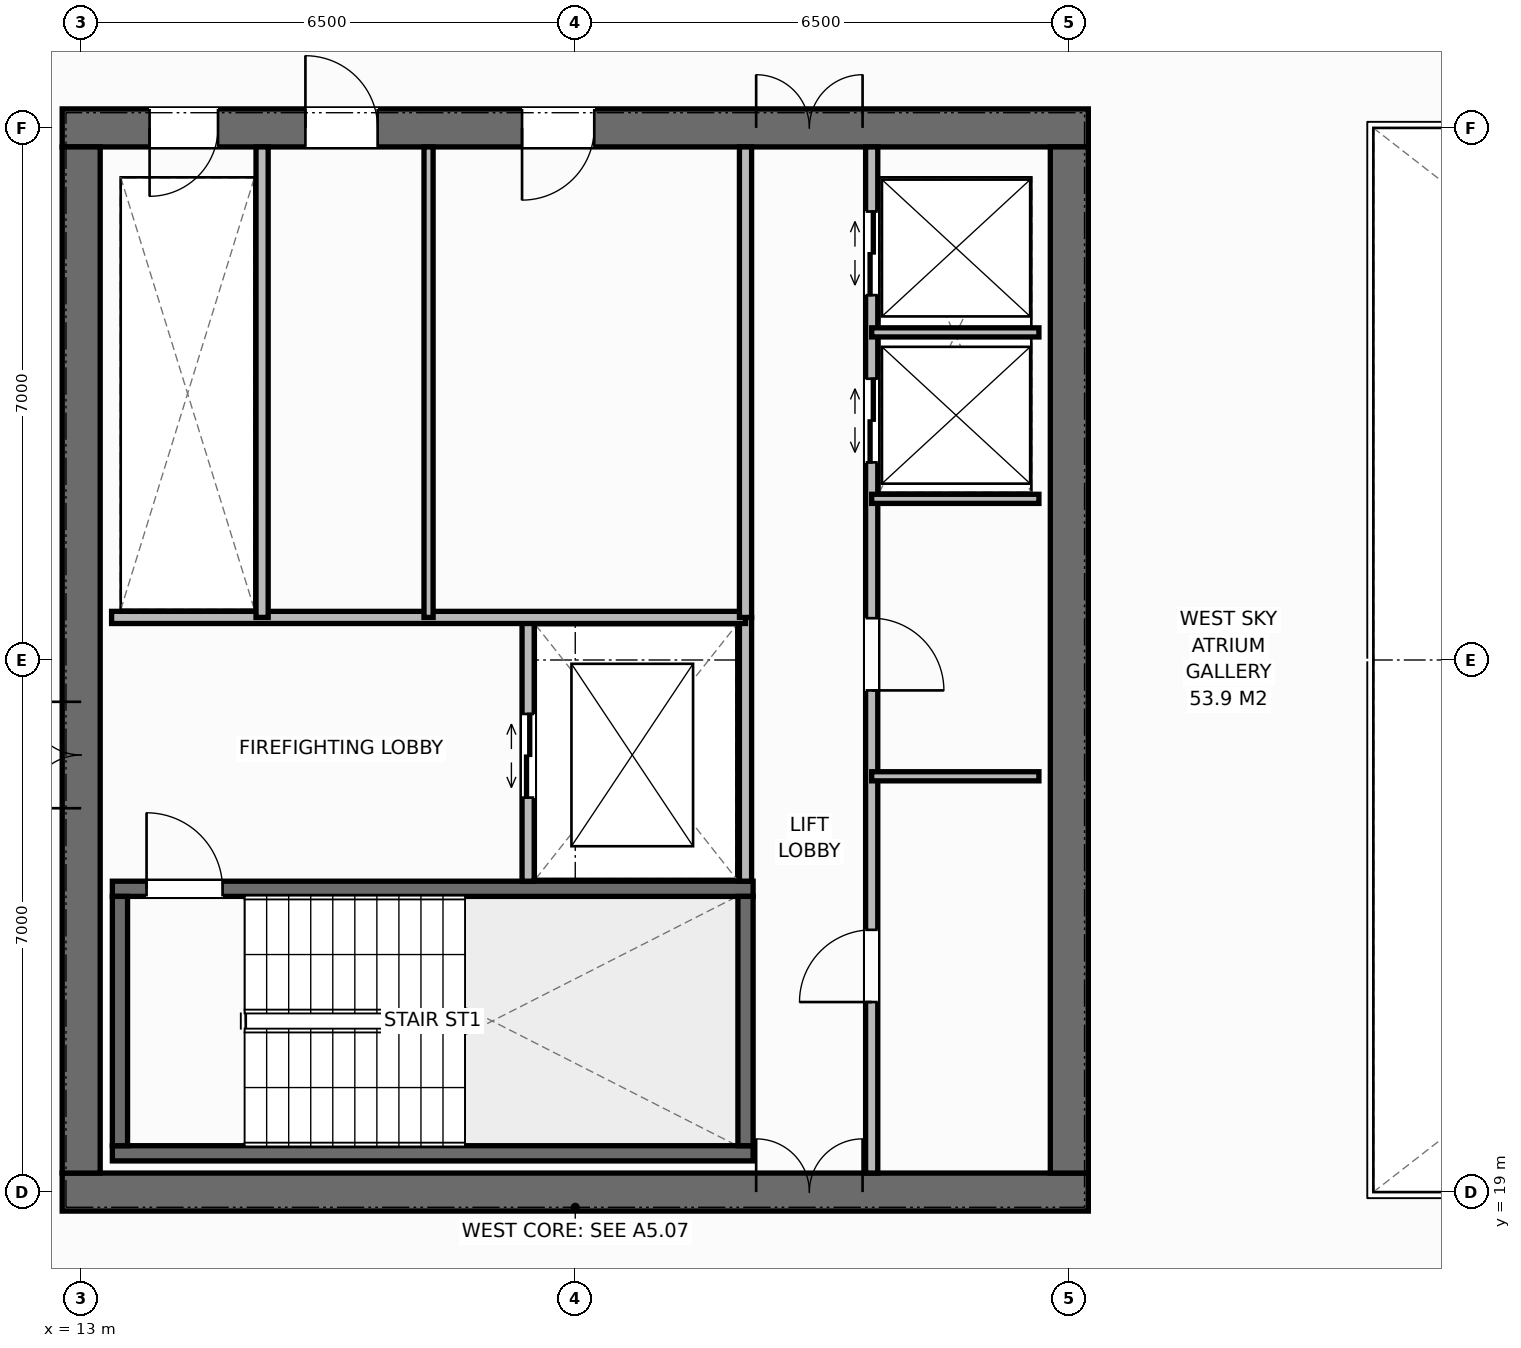
"""IFC4 building model, lengths in metres.
Left out: names, types, materials, properties, quantities, classifications, styles, units other than length and angle.
Written with IfcOpenShell. Run it as: python <this file> out.ifc"""

import sys

from ifc_helpers import new_model, si_unit, direction, frame, frame_2d, origin, place, context, subcontext, project, spatial, rectangle, extrude, element, fill, save


model = new_model("IFC4")
c1 = context("Model", 3, precision=1e-05, world=origin(), true_north=direction((0.0, 1.0)))
c2 = subcontext(c1, "Body", "Model", "MODEL_VIEW")
j1 = project(units=[si_unit("LENGTHUNIT", "METRE"), si_unit("PLANEANGLEUNIT", "RADIAN")], contexts=[c1])
p1 = place(None, origin())
s1 = spatial("IfcSite", under=j1, at=p1, CompositionType="ELEMENT")
p2 = place(p1, origin())
s2 = spatial("IfcBuilding", under=s1, at=p2, CompositionType="ELEMENT")
p3 = place(p2, frame((0.0, 0.0, 240.4)))
s3 = spatial("IfcBuildingStorey", under=s2, at=p3, CompositionType="ELEMENT", Elevation=240.4)
p4 = place(p3, frame((12.75, 19.0, 0.0), z_axis=(0.0, 0.0, 1.0), x_axis=(1.0, 0.0, 0.0)))
e1 = element("IfcWall", 1, at=p4, inside=s3, PredefinedType="SHEAR", context=c2, shape_type="SweptSolid", body=[
    extrude(rectangle(XDim=13.5, YDim=0.5, at=frame_2d((6.75, 0.0))), origin(), (0.0, 0.0, 1.0), 3.8),
])
p5 = place(p4, frame((9.13, 0.0, 0.0)))
e2 = element("IfcOpeningElement", 2, at=p5, cuts=e1, PredefinedType="OPENING", context=c2, shape_type="SweptSolid", body=[
    extrude(rectangle(XDim=1.4, YDim=2.2, at=frame_2d((0.7, 1.1))), frame((0.0, 0.26, 0.0), z_axis=(0.0, -1.0, 0.0), x_axis=(1.0, 0.0, 0.0)), (0.0, 0.0, 1.0), 0.52),
])
p6 = place(p3, frame((12.75, 33.0, 0.0), z_axis=(0.0, 0.0, 1.0), x_axis=(1.0, 0.0, 0.0)))
e3 = element("IfcWall", 3, at=p6, inside=s3, PredefinedType="SHEAR", context=c2, shape_type="SweptSolid", body=[
    extrude(rectangle(XDim=13.5, YDim=0.5, at=frame_2d((6.75, 0.0))), origin(), (0.0, 0.0, 1.0), 3.8),
])
p7 = place(p6, frame((1.15, 0.0, 0.0)))
e4 = element("IfcOpeningElement", 4, at=p7, cuts=e3, PredefinedType="OPENING", context=c2, shape_type="SweptSolid", body=[
    extrude(rectangle(XDim=0.9, YDim=2.15, at=frame_2d((0.45, 1.075))), frame((0.0, 0.26, 0.0), z_axis=(0.0, -1.0, 0.0), x_axis=(1.0, 0.0, 0.0)), (0.0, 0.0, 1.0), 0.52),
])
p8 = place(p6, frame((3.2, 0.0, 0.0)))
e5 = element("IfcOpeningElement", 5, at=p8, cuts=e3, PredefinedType="OPENING", context=c2, shape_type="SweptSolid", body=[
    extrude(rectangle(XDim=0.95, YDim=2.15, at=frame_2d((0.475, 1.075))), frame((0.0, 0.26, 0.0), z_axis=(0.0, -1.0, 0.0), x_axis=(1.0, 0.0, 0.0)), (0.0, 0.0, 1.0), 0.52),
])
p9 = place(p6, frame((6.05, 0.0, 0.0)))
e6 = element("IfcOpeningElement", 6, at=p9, cuts=e3, PredefinedType="OPENING", context=c2, shape_type="SweptSolid", body=[
    extrude(rectangle(XDim=0.95, YDim=2.15, at=frame_2d((0.475, 1.075))), frame((0.0, 0.26, 0.0), z_axis=(0.0, -1.0, 0.0), x_axis=(1.0, 0.0, 0.0)), (0.0, 0.0, 1.0), 0.52),
])
p10 = place(p6, frame((9.13, 0.0, 0.0)))
e7 = element("IfcOpeningElement", 7, at=p10, cuts=e3, PredefinedType="OPENING", context=c2, shape_type="SweptSolid", body=[
    extrude(rectangle(XDim=1.4, YDim=2.2, at=frame_2d((0.7, 1.1))), frame((0.0, 0.26, 0.0), z_axis=(0.0, -1.0, 0.0), x_axis=(1.0, 0.0, 0.0)), (0.0, 0.0, 1.0), 0.52),
])
p11 = place(p3, frame((13.0, 19.25, 0.0), z_axis=(0.0, 0.0, 1.0), x_axis=(0.0, 1.0, 0.0)))
e8 = element("IfcWall", 8, at=p11, inside=s3, PredefinedType="SHEAR", context=c2, shape_type="SweptSolid", body=[
    extrude(rectangle(XDim=13.5, YDim=0.5, at=frame_2d((6.75, 0.0))), origin(), (0.0, 0.0, 1.0), 3.8),
])
p12 = place(p11, frame((4.8, 0.0, 0.0)))
e9 = element("IfcOpeningElement", 9, at=p12, cuts=e8, PredefinedType="OPENING", context=c2, shape_type="SweptSolid", body=[
    extrude(rectangle(XDim=1.4, YDim=2.2, at=frame_2d((0.7, 1.1))), frame((0.0, 0.26, 0.0), z_axis=(0.0, -1.0, 0.0), x_axis=(1.0, 0.0, 0.0)), (0.0, 0.0, 1.0), 0.52),
])
p13 = place(p3, frame((26.0, 19.25, 0.0), z_axis=(0.0, 0.0, 1.0), x_axis=(0.0, 1.0, 0.0)))
e10 = element("IfcWall", 10, at=p13, inside=s3, PredefinedType="SHEAR", context=c2, shape_type="SweptSolid", body=[
    extrude(rectangle(XDim=13.5, YDim=0.5, at=frame_2d((6.75, 0.0))), origin(), (0.0, 0.0, 1.0), 3.8),
])
p14 = place(p3, frame((13.41, 19.51, 0.0), z_axis=(0.0, 0.0, 1.0), x_axis=(1.0, 0.0, 0.0)))
e11 = element("IfcWall", 11, at=p14, inside=s3, PredefinedType="SHEAR", context=c2, shape_type="SweptSolid", body=[
    extrude(rectangle(XDim=8.43, YDim=0.2, at=frame_2d((4.215, 0.0))), origin(), (0.0, 0.0, 1.0), 3.8),
])
p15 = place(p3, frame((13.41, 22.99, 0.0), z_axis=(0.0, 0.0, 1.0), x_axis=(1.0, 0.0, 0.0)))
e12 = element("IfcWall", 12, at=p15, inside=s3, PredefinedType="SHEAR", context=c2, shape_type="SweptSolid", body=[
    extrude(rectangle(XDim=8.43, YDim=0.2, at=frame_2d((4.215, 0.0))), origin(), (0.0, 0.0, 1.0), 3.8),
])
p16 = place(p15, frame((0.45, 0.0, 0.0)))
e13 = element("IfcOpeningElement", 13, at=p16, cuts=e12, PredefinedType="OPENING", context=c2, shape_type="SweptSolid", body=[
    extrude(rectangle(XDim=1.0, YDim=2.15, at=frame_2d((0.5, 1.075))), frame((0.0, 0.11, 0.0), z_axis=(0.0, -1.0, 0.0), x_axis=(1.0, 0.0, 0.0)), (0.0, 0.0, 1.0), 0.22),
])
for number, where, z_axis, x_axis in (
    (14, (13.51, 19.61, 0.0), (0.0, 0.0, 1.0), (0.0, 1.0, 0.0)),
    (15, (21.74, 19.61, 0.0), (0.0, 0.0, 1.0), (0.0, 1.0, 0.0)),
):
    element("IfcWall", number, at=place(p3, frame(where, z_axis=z_axis, x_axis=x_axis)), inside=s3, PredefinedType="SHEAR", context=c2, shape_type="SweptSolid", body=[
        extrude(rectangle(XDim=3.28, YDim=0.2, at=frame_2d((1.64, 0.0))), origin(), (0.0, 0.0, 1.0), 3.8),
    ])
p17 = place(p3, frame((21.74, 23.09, 0.0), z_axis=(0.0, 0.0, 1.0), x_axis=(0.0, 1.0, 0.0)))
e16 = element("IfcWall", 16, at=p17, inside=s3, PredefinedType="STANDARD", context=c2, shape_type="SweptSolid", body=[
    extrude(rectangle(XDim=3.47, YDim=0.16, at=frame_2d((1.735, 0.0))), origin(), (0.0, 0.0, 1.0), 3.58),
])
p18 = place(p3, frame((18.88, 23.09, 0.0), z_axis=(0.0, 0.0, 1.0), x_axis=(0.0, 1.0, 0.0)))
e17 = element("IfcWall", 17, at=p18, inside=s3, PredefinedType="STANDARD", context=c2, shape_type="SweptSolid", body=[
    extrude(rectangle(XDim=3.47, YDim=0.16, at=frame_2d((1.735, 0.0))), origin(), (0.0, 0.0, 1.0), 3.58),
])
p19 = place(p18, frame((1.1, 0.0, 0.0)))
e18 = element("IfcOpeningElement", 18, at=p19, cuts=e17, PredefinedType="OPENING", context=c2, shape_type="SweptSolid", body=[
    extrude(rectangle(XDim=1.1, YDim=2.2, at=frame_2d((0.55, 1.1))), frame((0.0, 0.09, 0.0), z_axis=(0.0, -1.0, 0.0), x_axis=(1.0, 0.0, 0.0)), (0.0, 0.0, 1.0), 0.18),
])
p20 = place(p3, frame((13.4, 26.56, 0.0), z_axis=(0.0, 0.0, 1.0), x_axis=(1.0, 0.0, 0.0)))
e19 = element("IfcWall", 19, at=p20, inside=s3, PredefinedType="STANDARD", context=c2, shape_type="SweptSolid", body=[
    extrude(rectangle(XDim=8.34, YDim=0.16, at=frame_2d((4.17, 0.0))), origin(), (0.0, 0.0, 1.0), 3.58),
])
p21 = place(p3, frame((15.38, 26.56, 0.0), z_axis=(0.0, 0.0, 1.0), x_axis=(0.0, 1.0, 0.0)))
e20 = element("IfcWall", 20, at=p21, inside=s3, PredefinedType="STANDARD", context=c2, shape_type="SweptSolid", body=[
    extrude(rectangle(XDim=6.19, YDim=0.16, at=frame_2d((3.095, 0.0))), origin(), (0.0, 0.0, 1.0), 3.58),
])
p22 = place(p3, frame((17.57, 26.56, 0.0), z_axis=(0.0, 0.0, 1.0), x_axis=(0.0, 1.0, 0.0)))
e21 = element("IfcWall", 21, at=p22, inside=s3, PredefinedType="PARTITIONING", context=c2, shape_type="SweptSolid", body=[
    extrude(rectangle(XDim=6.19, YDim=0.12, at=frame_2d((3.095, 0.0))), origin(), (0.0, 0.0, 1.0), 3.58),
])
p23 = place(p3, frame((21.74, 26.56, 0.0), z_axis=(0.0, 0.0, 1.0), x_axis=(0.0, 1.0, 0.0)))
e22 = element("IfcWall", 22, at=p23, inside=s3, PredefinedType="STANDARD", context=c2, shape_type="SweptSolid", body=[
    extrude(rectangle(XDim=6.19, YDim=0.16, at=frame_2d((3.095, 0.0))), origin(), (0.0, 0.0, 1.0), 3.58),
])
p24 = place(p3, frame((23.4, 19.25, 0.0), z_axis=(0.0, 0.0, 1.0), x_axis=(0.0, 1.0, 0.0)))
e23 = element("IfcWall", 23, at=p24, inside=s3, PredefinedType="STANDARD", context=c2, shape_type="SweptSolid", body=[
    extrude(rectangle(XDim=13.5, YDim=0.16, at=frame_2d((6.75, 0.0))), origin(), (0.0, 0.0, 1.0), 3.58),
])
p25 = place(p24, frame((2.25, 0.0, 0.0)))
e24 = element("IfcOpeningElement", 24, at=p25, cuts=e23, PredefinedType="OPENING", context=c2, shape_type="SweptSolid", body=[
    extrude(rectangle(XDim=0.95, YDim=2.15, at=frame_2d((0.475, 1.075))), frame((0.0, 0.09, 0.0), z_axis=(0.0, -1.0, 0.0), x_axis=(1.0, 0.0, 0.0)), (0.0, 0.0, 1.0), 0.18),
])
p26 = place(p24, frame((6.35, 0.0, 0.0)))
e25 = element("IfcOpeningElement", 25, at=p26, cuts=e23, PredefinedType="OPENING", context=c2, shape_type="SweptSolid", body=[
    extrude(rectangle(XDim=0.95, YDim=2.15, at=frame_2d((0.475, 1.075))), frame((0.0, 0.09, 0.0), z_axis=(0.0, -1.0, 0.0), x_axis=(1.0, 0.0, 0.0)), (0.0, 0.0, 1.0), 0.18),
])
p27 = place(p24, frame((9.35, 0.0, 0.0)))
e26 = element("IfcOpeningElement", 26, at=p27, cuts=e23, PredefinedType="OPENING", context=c2, shape_type="SweptSolid", body=[
    extrude(rectangle(XDim=1.1, YDim=2.2, at=frame_2d((0.55, 1.1))), frame((0.0, 0.09, 0.0), z_axis=(0.0, -1.0, 0.0), x_axis=(1.0, 0.0, 0.0)), (0.0, 0.0, 1.0), 0.18),
])
p28 = place(p24, frame((11.55, 0.0, 0.0)))
e27 = element("IfcOpeningElement", 27, at=p28, cuts=e23, PredefinedType="OPENING", context=c2, shape_type="SweptSolid", body=[
    extrude(rectangle(XDim=1.1, YDim=2.2, at=frame_2d((0.55, 1.1))), frame((0.0, 0.09, 0.0), z_axis=(0.0, -1.0, 0.0), x_axis=(1.0, 0.0, 0.0)), (0.0, 0.0, 1.0), 0.18),
])
for number, where, z_axis, x_axis in (
    (28, (23.4, 24.47, 0.0), (0.0, 0.0, 1.0), (1.0, 0.0, 0.0)),
    (29, (23.4, 28.12, 0.0), (0.0, 0.0, 1.0), (1.0, 0.0, 0.0)),
    (30, (23.4, 30.31, 0.0), (0.0, 0.0, 1.0), (1.0, 0.0, 0.0)),
):
    element("IfcWall", number, at=place(p3, frame(where, z_axis=z_axis, x_axis=x_axis)), inside=s3, PredefinedType="PARTITIONING", context=c2, shape_type="SweptSolid", body=[
        extrude(rectangle(XDim=2.2, YDim=0.12, at=frame_2d((1.1, 0.0))), origin(), (0.0, 0.0, 1.0), 3.58),
    ])
p29 = place(p16, origin())
e31 = element("IfcDoor", 31, at=p29, inside=s3, OperationType="SINGLE_SWING_LEFT", PredefinedType="DOOR", context=c2, shape_type="SweptSolid", body=[
    extrude(rectangle(XDim=1.0, YDim=2.15, at=frame_2d((0.5, 1.075))), frame((0.0, 0.025, 0.0), z_axis=(0.0, -1.0, 0.0), x_axis=(1.0, 0.0, 0.0)), (0.0, 0.0, 1.0), 0.05),
])
fill(e13, e31)
p30 = place(p12, origin())
e32 = element("IfcDoor", 32, at=p30, inside=s3, OperationType="DOUBLE_DOOR_SINGLE_SWING", PredefinedType="DOOR", context=c2, shape_type="SweptSolid", body=[
    extrude(rectangle(XDim=1.4, YDim=2.2, at=frame_2d((0.7, 1.1))), frame((0.0, 0.025, 0.0), z_axis=(0.0, -1.0, 0.0), x_axis=(1.0, 0.0, 0.0)), (0.0, 0.0, 1.0), 0.05),
])
fill(e9, e32)
p31 = place(p19, origin())
e33 = element("IfcDoor", 33, at=p31, inside=s3, OperationType="DOUBLE_DOOR_SLIDING", PredefinedType="DOOR", context=c2, shape_type="SweptSolid", body=[
    extrude(rectangle(XDim=1.1, YDim=2.2, at=frame_2d((0.55, 1.1))), frame((0.0, 0.025, 0.0), z_axis=(0.0, -1.0, 0.0), x_axis=(1.0, 0.0, 0.0)), (0.0, 0.0, 1.0), 0.05),
])
fill(e18, e33)
p32 = place(p7, origin())
e34 = element("IfcDoor", 34, at=p32, inside=s3, OperationType="SINGLE_SWING_RIGHT", PredefinedType="DOOR", context=c2, shape_type="SweptSolid", body=[
    extrude(rectangle(XDim=0.9, YDim=2.15, at=frame_2d((0.45, 1.075))), frame((0.0, -0.025, 0.0), z_axis=(0.0, -1.0, 0.0), x_axis=(1.0, 0.0, 0.0)), (0.0, 0.0, 1.0), 0.05),
])
fill(e4, e34)
p33 = place(p8, origin())
e35 = element("IfcDoor", 35, at=p33, inside=s3, OperationType="SINGLE_SWING_LEFT", PredefinedType="DOOR", context=c2, shape_type="SweptSolid", body=[
    extrude(rectangle(XDim=0.95, YDim=2.15, at=frame_2d((0.475, 1.075))), frame((0.0, -0.025, 0.0), z_axis=(0.0, -1.0, 0.0), x_axis=(1.0, 0.0, 0.0)), (0.0, 0.0, 1.0), 0.05),
])
fill(e5, e35)
p34 = place(p9, origin())
e36 = element("IfcDoor", 36, at=p34, inside=s3, OperationType="SINGLE_SWING_RIGHT", PredefinedType="DOOR", context=c2, shape_type="SweptSolid", body=[
    extrude(rectangle(XDim=0.95, YDim=2.15, at=frame_2d((0.475, 1.075))), frame((0.0, -0.025, 0.0), z_axis=(0.0, -1.0, 0.0), x_axis=(1.0, 0.0, 0.0)), (0.0, 0.0, 1.0), 0.05),
])
fill(e6, e36)
p35 = place(p5, origin())
e37 = element("IfcDoor", 37, at=p35, inside=s3, OperationType="DOUBLE_DOOR_SINGLE_SWING", PredefinedType="DOOR", context=c2, shape_type="SweptSolid", body=[
    extrude(rectangle(XDim=1.4, YDim=2.2, at=frame_2d((0.7, 1.1))), frame((0.0, 0.075, 0.0), z_axis=(0.0, -1.0, 0.0), x_axis=(1.0, 0.0, 0.0)), (0.0, 0.0, 1.0), 0.05),
])
fill(e2, e37)
p36 = place(p10, origin())
e38 = element("IfcDoor", 38, at=p36, inside=s3, OperationType="DOUBLE_DOOR_SINGLE_SWING", PredefinedType="DOOR", context=c2, shape_type="SweptSolid", body=[
    extrude(rectangle(XDim=1.4, YDim=2.2, at=frame_2d((0.7, 1.1))), frame((0.0, -0.025, 0.0), z_axis=(0.0, -1.0, 0.0), x_axis=(1.0, 0.0, 0.0)), (0.0, 0.0, 1.0), 0.05),
])
fill(e7, e38)
p37 = place(p25, origin())
e39 = element("IfcDoor", 39, at=p37, inside=s3, OperationType="SINGLE_SWING_LEFT", PredefinedType="DOOR", context=c2, shape_type="SweptSolid", body=[
    extrude(rectangle(XDim=0.95, YDim=2.15, at=frame_2d((0.475, 1.075))), frame((0.0, 0.025, 0.0), z_axis=(0.0, -1.0, 0.0), x_axis=(1.0, 0.0, 0.0)), (0.0, 0.0, 1.0), 0.05),
])
fill(e24, e39)
p38 = place(p26, origin())
e40 = element("IfcDoor", 40, at=p38, inside=s3, OperationType="SINGLE_SWING_RIGHT", PredefinedType="DOOR", context=c2, shape_type="SweptSolid", body=[
    extrude(rectangle(XDim=0.95, YDim=2.15, at=frame_2d((0.475, 1.075))), frame((0.0, 0.025, 0.0), z_axis=(0.0, -1.0, 0.0), x_axis=(1.0, 0.0, 0.0)), (0.0, 0.0, 1.0), 0.05),
])
fill(e25, e40)
p39 = place(p27, origin())
e41 = element("IfcDoor", 41, at=p39, inside=s3, OperationType="DOUBLE_DOOR_SLIDING", PredefinedType="DOOR", context=c2, shape_type="SweptSolid", body=[
    extrude(rectangle(XDim=1.1, YDim=2.2, at=frame_2d((0.55, 1.1))), frame((0.0, 0.025, 0.0), z_axis=(0.0, -1.0, 0.0), x_axis=(1.0, 0.0, 0.0)), (0.0, 0.0, 1.0), 0.05),
])
fill(e26, e41)
p40 = place(p28, origin())
e42 = element("IfcDoor", 42, at=p40, inside=s3, OperationType="DOUBLE_DOOR_SLIDING", PredefinedType="DOOR", context=c2, shape_type="SweptSolid", body=[
    extrude(rectangle(XDim=1.1, YDim=2.2, at=frame_2d((0.55, 1.1))), frame((0.0, 0.025, 0.0), z_axis=(0.0, -1.0, 0.0), x_axis=(1.0, 0.0, 0.0)), (0.0, 0.0, 1.0), 0.05),
])
fill(e27, e42)
save(model, sys.argv[1])
